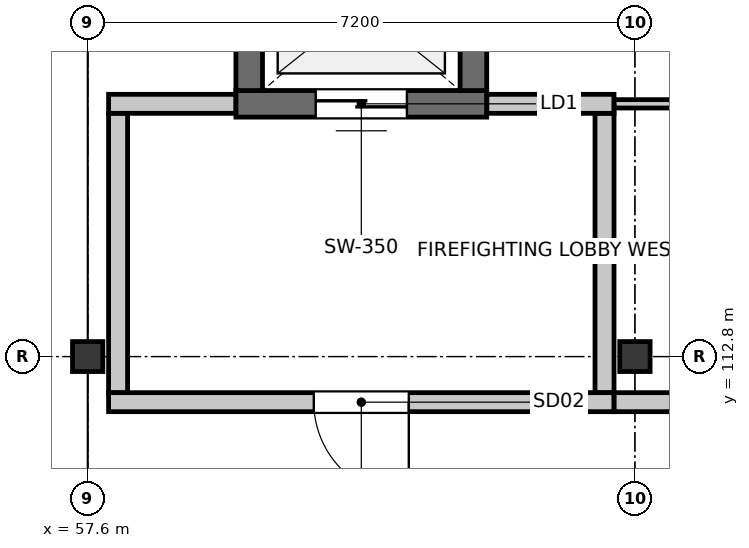
"""IFC4 building model, lengths in metres.
Left out: names, types, materials, properties, quantities, classifications, styles, units other than length and angle.
Written with IfcOpenShell. Run it as: python <this file> out.ifc"""

import sys

from ifc_helpers import new_model, si_unit, direction, frame, frame_2d, origin, origin_2d, place, context, subcontext, project, spatial, rectangle, i_section, extrude, element, fill, save


model = new_model("IFC4")
c1 = context("Model", 3, precision=1e-05, world=origin(), true_north=direction((0.0, 1.0)))
c2 = subcontext(c1, "Body", "Model", "MODEL_VIEW")
j1 = project(units=[si_unit("LENGTHUNIT", "METRE"), si_unit("PLANEANGLEUNIT", "RADIAN")], contexts=[c1])
p1 = place(None, origin())
s1 = spatial("IfcSite", under=j1, at=p1, CompositionType="ELEMENT")
p2 = place(p1, origin())
s2 = spatial("IfcBuilding", under=s1, at=p2, CompositionType="ELEMENT")
p3 = place(p2, frame((0.0, 0.0, 5.4)))
s3 = spatial("IfcBuildingStorey", under=s2, at=p3, CompositionType="ELEMENT", Elevation=5.4)
for number, where, z_axis, x_axis in (
    (1, (57.6, 112.8, 0.0), (0.0, 0.0, 1.0), (1.0, 0.0, 0.0)),
    (2, (64.8, 112.8, 0.0), (0.0, 0.0, 1.0), (1.0, 0.0, 0.0)),
):
    element("IfcColumn", number, at=place(p3, frame(where, z_axis=z_axis, x_axis=x_axis)), inside=s3, PredefinedType="COLUMN", context=c2, shape_type="SweptSolid", body=[
        extrude(i_section(OverallWidth=0.399, OverallDepth=0.394, WebThickness=0.023, FlangeThickness=0.037, FilletRadius=0.015, at=origin_2d()), origin(), (0.0, 0.0, 1.0), 3.9),
    ])
p4 = place(p3, frame((62.85, 116.125, 0.0), z_axis=(0.0, 0.0, 1.0), x_axis=(-1.0, 0.0, 0.0)))
e3 = element("IfcWall", 3, at=p4, inside=s3, PredefinedType="SHEAR", context=c2, shape_type="SweptSolid", body=[
    extrude(rectangle(XDim=3.3, YDim=0.35, at=frame_2d((1.65, 0.0))), origin(), (0.0, 0.0, 1.0), 3.67),
])
p5 = place(p4, frame((1.05, 0.0, 0.0)))
e4 = element("IfcOpeningElement", 4, at=p5, cuts=e3, PredefinedType="OPENING", context=c2, shape_type="SweptSolid", body=[
    extrude(rectangle(XDim=1.2, YDim=2.2, at=frame_2d((0.6, 1.1))), frame((0.0, 0.185, 0.0), z_axis=(0.0, -1.0, 0.0), x_axis=(1.0, 0.0, 0.0)), (0.0, 0.0, 1.0), 0.37),
])
for number, where, z_axis, x_axis in (
    (5, (59.725, 116.3, 0.0), (0.0, 0.0, 1.0), (0.0, 1.0, 0.0)),
    (6, (62.675, 118.5, 0.0), (0.0, 0.0, 1.0), (0.0, -1.0, 0.0)),
):
    element("IfcWall", number, at=place(p3, frame(where, z_axis=z_axis, x_axis=x_axis)), inside=s3, PredefinedType="SHEAR", context=c2, shape_type="SweptSolid", body=[
        extrude(rectangle(XDim=2.2, YDim=0.35, at=frame_2d((1.1, 0.0))), origin(), (0.0, 0.0, 1.0), 3.67),
    ])
p6 = place(p3, frame((64.525, 112.2, 0.0), z_axis=(0.0, 0.0, 1.0), x_axis=(-1.0, 0.0, 0.0)))
e7 = element("IfcWall", 7, at=p6, inside=s3, PredefinedType="PARTITIONING", context=c2, shape_type="SweptSolid", body=[
    extrude(rectangle(XDim=6.65, YDim=0.25, at=frame_2d((3.325, 0.0))), origin(), (0.0, 0.0, 1.0), 2.967),
])
p7 = place(p6, frame((2.7, 0.0, 0.0)))
e8 = element("IfcOpeningElement", 8, at=p7, cuts=e7, PredefinedType="OPENING", context=c2, shape_type="SweptSolid", body=[
    extrude(rectangle(XDim=1.25, YDim=2.2, at=frame_2d((0.625, 1.1))), frame((0.0, 0.135, 0.0), z_axis=(0.0, -1.0, 0.0), x_axis=(1.0, 0.0, 0.0)), (0.0, 0.0, 1.0), 0.27),
])
p8 = place(p3, frame((57.875, 116.125, 0.0), z_axis=(0.0, 0.0, 1.0), x_axis=(1.0, 0.0, 0.0)))
e9 = element("IfcWall", 9, at=p8, inside=s3, PredefinedType="PARTITIONING", context=c2, shape_type="SweptSolid", body=[
    extrude(rectangle(XDim=1.673, YDim=0.25, at=frame_2d((0.836, 0.0))), origin(), (0.0, 0.0, 1.0), 2.967),
])
p9 = place(p3, frame((62.852, 116.125, 0.0), z_axis=(0.0, 0.0, 1.0), x_axis=(1.0, 0.0, 0.0)))
e10 = element("IfcWall", 10, at=p9, inside=s3, PredefinedType="PARTITIONING", context=c2, shape_type="SweptSolid", body=[
    extrude(rectangle(XDim=1.673, YDim=0.25, at=frame_2d((0.836, 0.0))), origin(), (0.0, 0.0, 1.0), 2.967),
])
for number, where, z_axis, x_axis in (
    (11, (58.0, 112.327, 0.0), (0.0, 0.0, 1.0), (0.0, 1.0, 0.0)),
    (12, (64.4, 115.998, 0.0), (0.0, 0.0, 1.0), (0.0, -1.0, 0.0)),
):
    element("IfcWall", number, at=place(p3, frame(where, z_axis=z_axis, x_axis=x_axis)), inside=s3, PredefinedType="PARTITIONING", context=c2, shape_type="SweptSolid", body=[
        extrude(rectangle(XDim=3.671, YDim=0.25, at=frame_2d((1.835, 0.0))), origin(), (0.0, 0.0, 1.0), 2.967),
    ])
p10 = place(p3, frame((76.88, 112.2, 0.0), z_axis=(0.0, 0.0, 1.0), x_axis=(-1.0, 0.0, 0.0)))
e13 = element("IfcWall", 13, at=p10, inside=s3, PredefinedType="PARTITIONING", context=c2, shape_type="SweptSolid", body=[
    extrude(rectangle(XDim=12.353, YDim=0.25, at=frame_2d((6.176, 0.0))), origin(), (0.0, 0.0, 1.0), 2.967),
])
p11 = place(p10, frame((5.536, 0.0, 0.0)))
e14 = element("IfcOpeningElement", 14, at=p11, cuts=e13, PredefinedType="OPENING", context=c2, shape_type="SweptSolid", body=[
    extrude(rectangle(XDim=1.28, YDim=2.28, at=frame_2d((0.64, 1.14))), frame((0.0, 0.135, 0.0), z_axis=(0.0, -1.0, 0.0), x_axis=(1.0, 0.0, 0.0)), (0.0, 0.0, 1.0), 0.27),
])
p12 = place(p3, frame((64.527, 116.125, 0.0), z_axis=(0.0, 0.0, 1.0), x_axis=(1.0, 0.0, 0.0)))
e15 = element("IfcWall", 15, at=p12, inside=s3, PredefinedType="PARTITIONING", context=c2, shape_type="SweptSolid", body=[
    extrude(rectangle(XDim=12.353, YDim=0.11, at=frame_2d((6.176, 0.0))), origin(), (0.0, 0.0, 1.0), 2.967),
])
p13 = place(p5, origin())
e16 = element("IfcDoor", 16, at=p13, inside=s3, OperationType="DOUBLE_DOOR_SLIDING", PredefinedType="DOOR", context=c2, shape_type="SweptSolid", body=[
    extrude(rectangle(XDim=1.2, YDim=2.2, at=frame_2d((0.6, 1.1))), frame((0.0, 0.025, 0.0), z_axis=(0.0, -1.0, 0.0), x_axis=(1.0, 0.0, 0.0)), (0.0, 0.0, 1.0), 0.05),
])
fill(e4, e16)
p14 = place(p7, origin())
e17 = element("IfcDoor", 17, at=p14, inside=s3, OperationType="SINGLE_SWING_LEFT", PredefinedType="DOOR", context=c2, shape_type="SweptSolid", body=[
    extrude(rectangle(XDim=1.25, YDim=2.2, at=frame_2d((0.625, 1.1))), frame((0.0, 0.025, 0.0), z_axis=(0.0, -1.0, 0.0), x_axis=(1.0, 0.0, 0.0)), (0.0, 0.0, 1.0), 0.05),
])
fill(e8, e17)
save(model, sys.argv[1])
